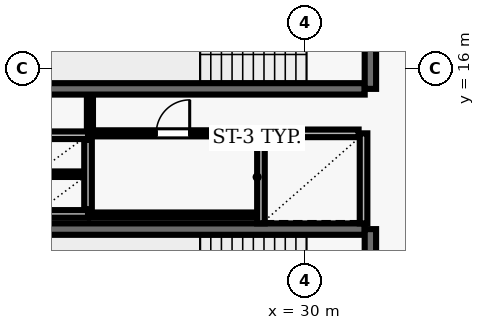
"""IFC4 building model, lengths in metres.
Left out: names, types, materials, properties, quantities, classifications, styles, units other than length and angle.
Written with IfcOpenShell. Run it as: python <this file> out.ifc"""

import sys

from ifc_helpers import new_model, si_unit, direction, frame, frame_2d, origin, place, context, subcontext, project, spatial, rectangle, extrude, element, fill, save


model = new_model("IFC4")
c1 = context("Model", 3, precision=1e-05, world=origin(), true_north=direction((0.0, 1.0)))
c2 = subcontext(c1, "Body", "Model", "MODEL_VIEW")
j1 = project(units=[si_unit("LENGTHUNIT", "METRE"), si_unit("PLANEANGLEUNIT", "RADIAN")], contexts=[c1])
p1 = place(None, origin())
s1 = spatial("IfcSite", under=j1, at=p1, CompositionType="ELEMENT")
p2 = place(p1, origin())
s2 = spatial("IfcBuilding", under=s1, at=p2, CompositionType="ELEMENT")
p3 = place(p2, frame((0.0, 0.0, 73.9)))
s3 = spatial("IfcBuildingStorey", under=s2, at=p3, CompositionType="ELEMENT", Elevation=73.9)
p4 = place(p3, frame((23.22, 15.47, 0.0), z_axis=(0.0, 0.0, 1.0), x_axis=(1.0, 0.0, 0.0)))
e1 = element("IfcWall", 1, at=p4, inside=s3, PredefinedType="SHEAR", context=c2, shape_type="SweptSolid", body=[
    extrude(rectangle(XDim=8.36, YDim=0.3, at=frame_2d((4.18, 0.0))), origin(), (0.0, 0.0, 1.0), 3.69),
])
p5 = place(p3, frame((31.73, 15.47, 0.0), z_axis=(0.0, 0.0, 1.0), x_axis=(0.0, 1.0, 0.0)))
e2 = element("IfcWall", 2, at=p5, inside=s3, PredefinedType="SHEAR", context=c2, shape_type="SweptSolid", body=[
    extrude(rectangle(XDim=3.51, YDim=0.3, at=frame_2d((1.755, 0.0))), origin(), (0.0, 0.0, 1.0), 3.69),
])
p6 = place(p5, frame((1.18, 0.0, 0.0)))
e3 = element("IfcOpeningElement", 3, at=p6, cuts=e2, PredefinedType="OPENING", context=c2, shape_type="SweptSolid", body=[
    extrude(rectangle(XDim=1.15, YDim=2.15, at=frame_2d((0.575, 1.075))), frame((0.0, 0.16, 0.0), z_axis=(0.0, -1.0, 0.0), x_axis=(1.0, 0.0, 0.0)), (0.0, 0.0, 1.0), 0.32),
])
p7 = place(p3, frame((31.58, 11.78, 0.0), z_axis=(0.0, 0.0, 1.0), x_axis=(-1.0, 0.0, 0.0)))
e4 = element("IfcWall", 4, at=p7, inside=s3, PredefinedType="SHEAR", context=c2, shape_type="SweptSolid", body=[
    extrude(rectangle(XDim=8.36, YDim=0.3, at=frame_2d((4.18, 0.0))), origin(), (0.0, 0.0, 1.0), 3.69),
])
p8 = place(p3, frame((31.73, 8.27, 0.0), z_axis=(0.0, 0.0, 1.0), x_axis=(0.0, 1.0, 0.0)))
e5 = element("IfcWall", 5, at=p8, inside=s3, PredefinedType="SHEAR", context=c2, shape_type="SweptSolid", body=[
    extrude(rectangle(XDim=3.51, YDim=0.3, at=frame_2d((1.755, 0.0))), origin(), (0.0, 0.0, 1.0), 3.69),
])
p9 = place(p8, frame((1.18, 0.0, 0.0)))
e6 = element("IfcOpeningElement", 6, at=p9, cuts=e5, PredefinedType="OPENING", context=c2, shape_type="SweptSolid", body=[
    extrude(rectangle(XDim=1.15, YDim=2.15, at=frame_2d((0.575, 1.075))), frame((0.0, 0.16, 0.0), z_axis=(0.0, -1.0, 0.0), x_axis=(1.0, 0.0, 0.0)), (0.0, 0.0, 1.0), 0.32),
])
for number, where, z_axis, x_axis in (
    (7, (28.85, 14.3, 0.0), (0.0, 0.0, 1.0), (0.0, -1.0, 0.0)),
    (8, (31.55, 11.93, 0.0), (0.0, 0.0, 1.0), (0.0, 1.0, 0.0)),
):
    element("IfcWall", number, at=place(p3, frame(where, z_axis=z_axis, x_axis=x_axis)), inside=s3, PredefinedType="SOLIDWALL", context=c2, shape_type="SweptSolid", body=[
        extrude(rectangle(XDim=2.37, YDim=0.2, at=frame_2d((1.185, 0.0))), origin(), (0.0, 0.0, 1.0), 3.69),
    ])
p10 = place(p3, frame((31.42, 14.3, 0.0), z_axis=(0.0, 0.0, 1.0), x_axis=(-1.0, 0.0, 0.0)))
e9 = element("IfcWall", 9, at=p10, inside=s3, PredefinedType="SOLIDWALL", context=c2, shape_type="SweptSolid", body=[
    extrude(rectangle(XDim=2.44, YDim=0.2, at=frame_2d((1.22, 0.0))), origin(), (0.0, 0.0, 1.0), 3.69),
])
for number, where, z_axis, x_axis in (
    (10, (22.9, 14.25, 0.0), (0.0, 0.0, 1.0), (1.0, 0.0, 0.0)),
    (11, (22.9, 12.18, 0.0), (0.0, 0.0, 1.0), (1.0, 0.0, 0.0)),
):
    element("IfcWall", number, at=place(p3, frame(where, z_axis=z_axis, x_axis=x_axis)), inside=s3, PredefinedType="SOLIDWALL", context=c2, shape_type="SweptSolid", body=[
        extrude(rectangle(XDim=1.4, YDim=0.2, at=frame_2d((0.7, 0.0))), origin(), (0.0, 0.0, 1.0), 3.69),
    ])
p11 = place(p3, frame((24.3, 12.3, 0.0), z_axis=(0.0, 0.0, 1.0), x_axis=(0.0, 1.0, 0.0)))
e12 = element("IfcWall", 12, at=p11, inside=s3, PredefinedType="SOLIDWALL", context=c2, shape_type="SweptSolid", body=[
    extrude(rectangle(XDim=1.83, YDim=0.2, at=frame_2d((0.915, 0.0))), origin(), (0.0, 0.0, 1.0), 3.69),
])
p12 = place(p3, frame((23.01, 13.225, 0.0), z_axis=(0.0, 0.0, 1.0), x_axis=(1.0, 0.0, 0.0)))
e13 = element("IfcWall", 13, at=p12, inside=s3, PredefinedType="PARTITIONING", context=c2, shape_type="SweptSolid", body=[
    extrude(rectangle(XDim=1.18, YDim=0.145, at=frame_2d((0.59, 0.0))), origin(), (0.0, 0.0, 1.0), 3.69),
])
p13 = place(p3, frame((24.35, 12.15, 0.0), z_axis=(0.0, 0.0, 1.0), x_axis=(1.0, 0.0, 0.0)))
e14 = element("IfcWall", 14, at=p13, inside=s3, PredefinedType="PARTITIONING", context=c2, shape_type="SweptSolid", body=[
    extrude(rectangle(XDim=4.37, YDim=0.135, at=frame_2d((2.185, 0.0))), origin(), (0.0, 0.0, 1.0), 3.69),
])
p14 = place(p3, frame((24.35, 14.3, 0.0), z_axis=(0.0, 0.0, 1.0), x_axis=(1.0, 0.0, 0.0)))
e15 = element("IfcWall", 15, at=p14, inside=s3, PredefinedType="PARTITIONING", context=c2, shape_type="SweptSolid", body=[
    extrude(rectangle(XDim=4.37, YDim=0.16, at=frame_2d((2.185, 0.0))), origin(), (0.0, 0.0, 1.0), 3.69),
])
p15 = place(p14, frame((1.745, 0.0, 0.0)))
e16 = element("IfcOpeningElement", 16, at=p15, cuts=e15, PredefinedType="OPENING", context=c2, shape_type="SweptSolid", body=[
    extrude(rectangle(XDim=0.88, YDim=2.1, at=frame_2d((0.44, 1.05))), frame((0.0, 0.09, 0.0), z_axis=(0.0, -1.0, 0.0), x_axis=(1.0, 0.0, 0.0)), (0.0, 0.0, 1.0), 0.18),
])
p16 = place(p3, frame((24.35, 15.29, 0.0), z_axis=(0.0, 0.0, 1.0), x_axis=(0.0, -1.0, 0.0)))
e17 = element("IfcWall", 17, at=p16, inside=s3, PredefinedType="PARTITIONING", context=c2, shape_type="SweptSolid", body=[
    extrude(rectangle(XDim=0.915, YDim=0.16, at=frame_2d((0.458, 0.0))), origin(), (0.0, 0.0, 1.0), 3.69),
])
p17 = place(p15, origin())
e18 = element("IfcDoor", 18, at=p17, inside=s3, OperationType="SINGLE_SWING_RIGHT", PredefinedType="DOOR", context=c2, shape_type="SweptSolid", body=[
    extrude(rectangle(XDim=0.88, YDim=2.1, at=frame_2d((0.44, 1.05))), frame((0.0, 0.025, 0.0), z_axis=(0.0, -1.0, 0.0), x_axis=(1.0, 0.0, 0.0)), (0.0, 0.0, 1.0), 0.05),
])
fill(e16, e18)
save(model, sys.argv[1])
